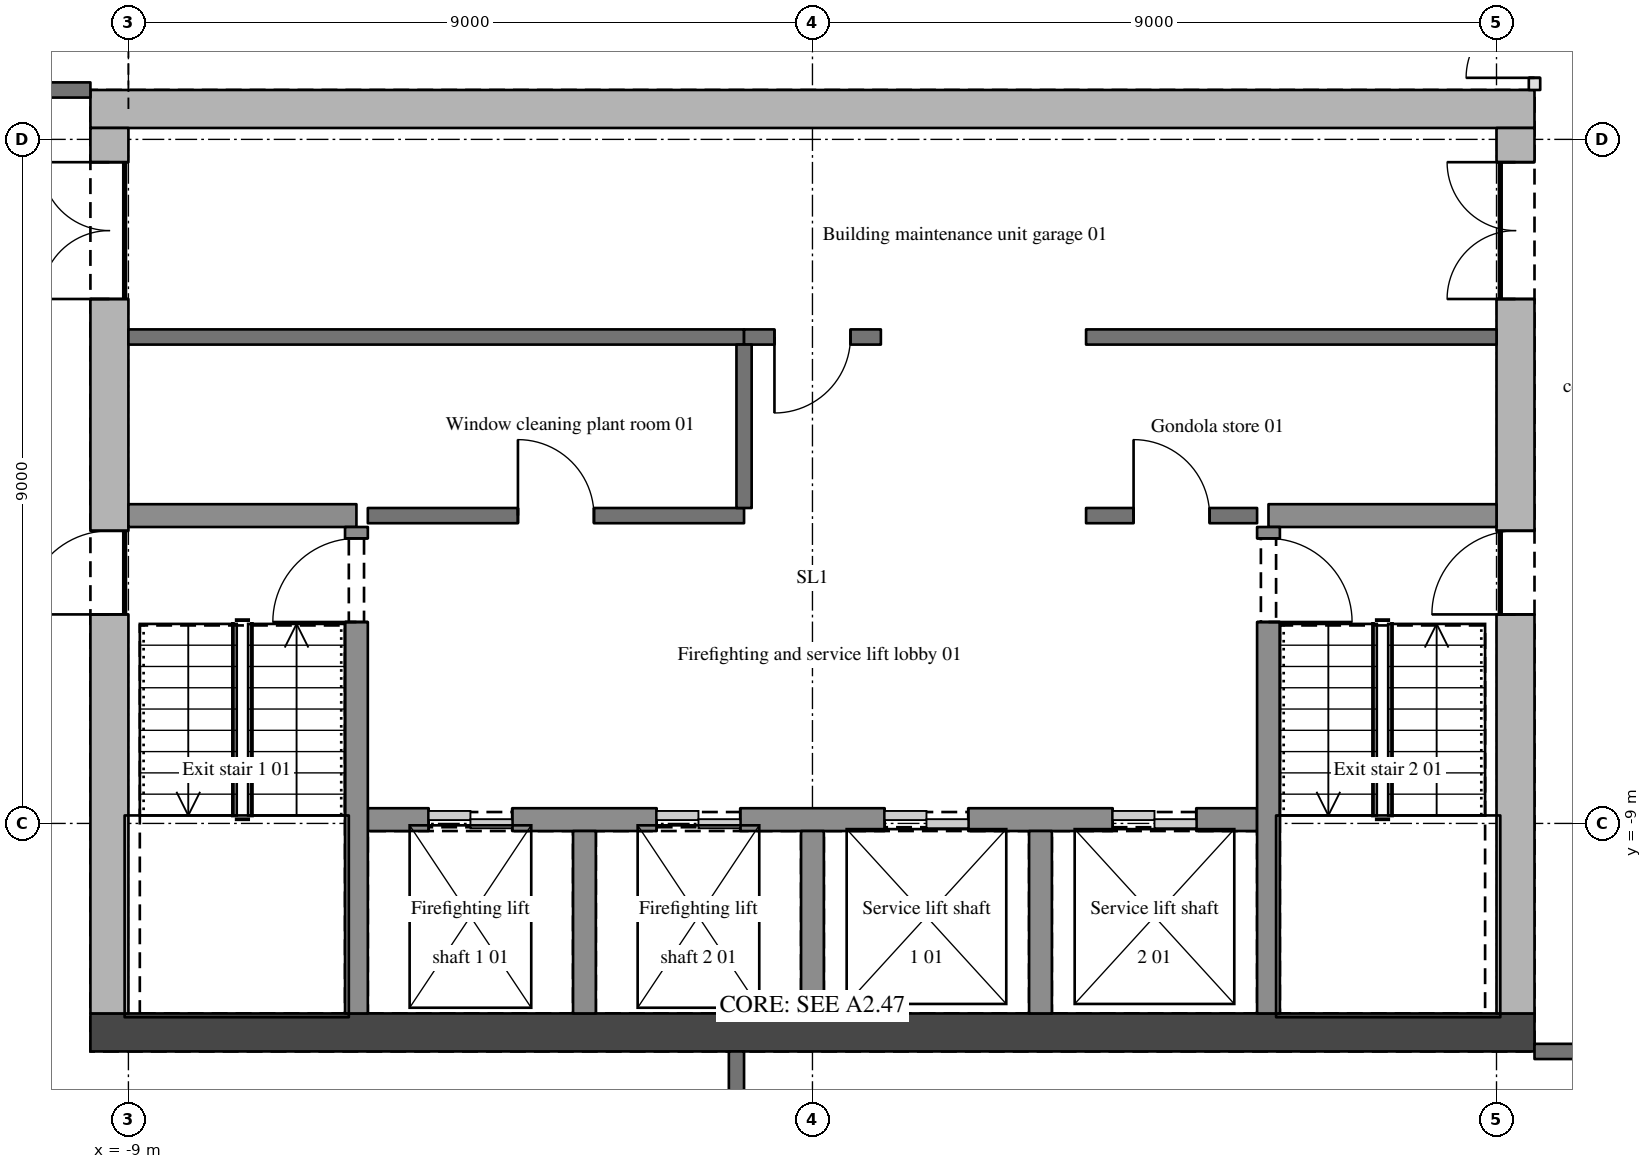
"""IFC4 building model, lengths in metres.
Left out: names, types, materials, properties, quantities, classifications, styles, units other than length and angle.
Written with IfcOpenShell. Run it as: python <this file> out.ifc"""

import sys

from ifc_helpers import new_model, si_unit, direction, frame, frame_2d, origin, place, context, subcontext, project, spatial, polyline, rectangle, outline, extrude, element, fill, save


model = new_model("IFC4")
c1 = context("Model", 3, precision=1e-05, world=origin(), true_north=direction((0.0, 1.0)))
c2 = subcontext(c1, "Body", "Model", "MODEL_VIEW")
j1 = project(units=[si_unit("LENGTHUNIT", "METRE"), si_unit("PLANEANGLEUNIT", "RADIAN")], contexts=[c1])
p1 = place(None, origin())
s1 = spatial("IfcSite", under=j1, at=p1, CompositionType="ELEMENT")
p2 = place(p1, origin())
s2 = spatial("IfcBuilding", under=s1, at=p2, CompositionType="ELEMENT")
p3 = place(p2, frame((0.0, 0.0, 308.1)))
s3 = spatial("IfcBuildingStorey", under=s2, at=p3, CompositionType="ELEMENT", Elevation=308.1)
for number, where, z_axis, x_axis in (
    (1, (-9.5, -11.75, 0.0), (0.0, 0.0, 1.0), (1.0, 0.0, 0.0)),
    (2, (-9.5, 0.4, 0.0), (0.0, 0.0, 1.0), (1.0, 0.0, 0.0)),
):
    element("IfcWall", number, at=place(p3, frame(where, z_axis=z_axis, x_axis=x_axis)), inside=s3, PredefinedType="SHEAR", context=c2, shape_type="SweptSolid", body=[
        extrude(outline(polyline([(0.0, 0.0), (19.0, 0.0), (19.0, 3.6), (0.0, 3.6), (0.0, 0.0)])), frame((0.0, 0.25, 0.0), z_axis=(0.0, -1.0, 0.0), x_axis=(1.0, 0.0, 0.0)), (0.0, 0.0, 1.0), 0.5),
    ])
p4 = place(p3, frame((-9.25, -11.5, 0.0), z_axis=(0.0, 0.0, 1.0), x_axis=(0.0, 1.0, 0.0)))
e3 = element("IfcWall", 3, at=p4, inside=s3, PredefinedType="SHEAR", context=c2, shape_type="SweptSolid", body=[
    extrude(outline(polyline([(0.0, 0.0), (11.65, 0.0), (11.65, 3.6), (0.0, 3.6), (0.0, 0.0)])), frame((0.0, 0.25, 0.0), z_axis=(0.0, -1.0, 0.0), x_axis=(1.0, 0.0, 0.0)), (0.0, 0.0, 1.0), 0.5),
])
p5 = place(p4, frame((9.4, 0.0, 0.0)))
e4 = element("IfcOpeningElement", 4, at=p5, cuts=e3, PredefinedType="OPENING", context=c2, shape_type="SweptSolid", body=[
    extrude(rectangle(XDim=1.8, YDim=2.1, at=frame_2d((0.9, 1.05))), frame((0.0, 0.26, 0.0), z_axis=(0.0, -1.0, 0.0), x_axis=(1.0, 0.0, 0.0)), (0.0, 0.0, 1.0), 0.52),
])
p6 = place(p4, frame((5.25, 0.0, 0.0)))
e5 = element("IfcOpeningElement", 5, at=p6, cuts=e3, PredefinedType="OPENING", context=c2, shape_type="SweptSolid", body=[
    extrude(rectangle(XDim=1.1, YDim=2.1, at=frame_2d((0.55, 1.05))), frame((0.0, 0.26, 0.0), z_axis=(0.0, -1.0, 0.0), x_axis=(1.0, 0.0, 0.0)), (0.0, 0.0, 1.0), 0.52),
])
p7 = place(p3, frame((9.25, -11.5, 0.0), z_axis=(0.0, 0.0, 1.0), x_axis=(0.0, 1.0, 0.0)))
e6 = element("IfcWall", 6, at=p7, inside=s3, PredefinedType="SHEAR", context=c2, shape_type="SweptSolid", body=[
    extrude(outline(polyline([(0.0, 0.0), (11.65, 0.0), (11.65, 3.6), (0.0, 3.6), (0.0, 0.0)])), frame((0.0, 0.25, 0.0), z_axis=(0.0, -1.0, 0.0), x_axis=(1.0, 0.0, 0.0)), (0.0, 0.0, 1.0), 0.5),
])
p8 = place(p7, frame((9.4, 0.0, 0.0)))
e7 = element("IfcOpeningElement", 7, at=p8, cuts=e6, PredefinedType="OPENING", context=c2, shape_type="SweptSolid", body=[
    extrude(rectangle(XDim=1.8, YDim=2.1, at=frame_2d((0.9, 1.05))), frame((0.0, 0.26, 0.0), z_axis=(0.0, -1.0, 0.0), x_axis=(1.0, 0.0, 0.0)), (0.0, 0.0, 1.0), 0.52),
])
p9 = place(p7, frame((5.25, 0.0, 0.0)))
e8 = element("IfcOpeningElement", 8, at=p9, cuts=e6, PredefinedType="OPENING", context=c2, shape_type="SweptSolid", body=[
    extrude(rectangle(XDim=1.1, YDim=2.1, at=frame_2d((0.55, 1.05))), frame((0.0, 0.26, 0.0), z_axis=(0.0, -1.0, 0.0), x_axis=(1.0, 0.0, 0.0)), (0.0, 0.0, 1.0), 0.52),
])
p10 = place(p3, frame((11.45, -12.0, 0.0), z_axis=(0.0, 0.0, 1.0), x_axis=(-1.0, 0.0, 0.0)))
e9 = element("IfcWall", 9, at=p10, inside=s3, PredefinedType="SOLIDWALL", context=c2, shape_type="SweptSolid", body=[
    extrude(rectangle(XDim=1.95, YDim=0.2, at=frame_2d((0.975, 0.0))), origin(), (0.0, 0.0, 1.0), 2.66),
])
p11 = place(p10, frame((0.525, 0.0, 0.0)))
e10 = element("IfcOpeningElement", 10, at=p11, cuts=e9, PredefinedType="OPENING", context=c2, shape_type="SweptSolid", body=[
    extrude(rectangle(XDim=0.9, YDim=2.1, at=frame_2d((0.45, 1.05))), frame((0.0, 0.11, 0.0), z_axis=(0.0, -1.0, 0.0), x_axis=(1.0, 0.0, 0.0)), (0.0, 0.0, 1.0), 0.22),
])
p12 = place(p3, frame((-5.85, -8.95, 0.0), z_axis=(0.0, 0.0, 1.0), x_axis=(1.0, 0.0, 0.0)))
e11 = element("IfcWall", 11, at=p12, inside=s3, PredefinedType="SHEAR", context=c2, shape_type="SweptSolid", body=[
    extrude(rectangle(XDim=11.7, YDim=0.3, at=frame_2d((5.85, 0.0))), origin(), (0.0, 0.0, 1.0), 3.6),
])
p13 = place(p12, frame((0.8, 0.0, 0.0)))
e12 = element("IfcOpeningElement", 12, at=p13, cuts=e11, PredefinedType="OPENING", context=c2, shape_type="SweptSolid", body=[
    extrude(rectangle(XDim=1.1, YDim=2.1, at=frame_2d((0.55, 1.05))), frame((0.0, 0.16, 0.0), z_axis=(0.0, -1.0, 0.0), x_axis=(1.0, 0.0, 0.0)), (0.0, 0.0, 1.0), 0.32),
])
p14 = place(p12, frame((3.8, 0.0, 0.0)))
e13 = element("IfcOpeningElement", 13, at=p14, cuts=e11, PredefinedType="OPENING", context=c2, shape_type="SweptSolid", body=[
    extrude(rectangle(XDim=1.1, YDim=2.1, at=frame_2d((0.55, 1.05))), frame((0.0, 0.16, 0.0), z_axis=(0.0, -1.0, 0.0), x_axis=(1.0, 0.0, 0.0)), (0.0, 0.0, 1.0), 0.32),
])
p15 = place(p12, frame((6.8, 0.0, 0.0)))
e14 = element("IfcOpeningElement", 14, at=p15, cuts=e11, PredefinedType="OPENING", context=c2, shape_type="SweptSolid", body=[
    extrude(rectangle(XDim=1.1, YDim=2.1, at=frame_2d((0.55, 1.05))), frame((0.0, 0.16, 0.0), z_axis=(0.0, -1.0, 0.0), x_axis=(1.0, 0.0, 0.0)), (0.0, 0.0, 1.0), 0.32),
])
p16 = place(p12, frame((9.8, 0.0, 0.0)))
e15 = element("IfcOpeningElement", 15, at=p16, cuts=e11, PredefinedType="OPENING", context=c2, shape_type="SweptSolid", body=[
    extrude(rectangle(XDim=1.1, YDim=2.1, at=frame_2d((0.55, 1.05))), frame((0.0, 0.16, 0.0), z_axis=(0.0, -1.0, 0.0), x_axis=(1.0, 0.0, 0.0)), (0.0, 0.0, 1.0), 0.32),
])
p17 = place(p3, frame((-9.0, -4.95, 0.0), z_axis=(0.0, 0.0, 1.0), x_axis=(1.0, 0.0, 0.0)))
e16 = element("IfcWall", 16, at=p17, inside=s3, PredefinedType="SHEAR", context=c2, shape_type="SweptSolid", body=[
    extrude(rectangle(XDim=3.0, YDim=0.3, at=frame_2d((1.5, 0.0))), origin(), (0.0, 0.0, 1.0), 3.6),
])
p18 = place(p3, frame((-5.85, -4.95, 0.0), z_axis=(0.0, 0.0, 1.0), x_axis=(1.0, 0.0, 0.0)))
e17 = element("IfcWall", 17, at=p18, inside=s3, PredefinedType="SOLIDWALL", context=c2, shape_type="SweptSolid", body=[
    extrude(rectangle(XDim=4.95, YDim=0.2, at=frame_2d((2.475, 0.0))), origin(), (0.0, 0.0, 1.0), 3.3),
])
p19 = place(p18, frame((1.975, 0.0, 0.0)))
e18 = element("IfcOpeningElement", 18, at=p19, cuts=e17, PredefinedType="OPENING", context=c2, shape_type="SweptSolid", body=[
    extrude(rectangle(XDim=1.0, YDim=2.1, at=frame_2d((0.5, 1.05))), frame((0.0, 0.11, 0.0), z_axis=(0.0, -1.0, 0.0), x_axis=(1.0, 0.0, 0.0)), (0.0, 0.0, 1.0), 0.22),
])
p20 = place(p3, frame((3.6, -4.95, 0.0), z_axis=(0.0, 0.0, 1.0), x_axis=(1.0, 0.0, 0.0)))
e19 = element("IfcWall", 19, at=p20, inside=s3, PredefinedType="SOLIDWALL", context=c2, shape_type="SweptSolid", body=[
    extrude(rectangle(XDim=2.25, YDim=0.2, at=frame_2d((1.125, 0.0))), origin(), (0.0, 0.0, 1.0), 3.3),
])
p21 = place(p20, frame((0.625, 0.0, 0.0)))
e20 = element("IfcOpeningElement", 20, at=p21, cuts=e19, PredefinedType="OPENING", context=c2, shape_type="SweptSolid", body=[
    extrude(rectangle(XDim=1.0, YDim=2.1, at=frame_2d((0.5, 1.05))), frame((0.0, 0.11, 0.0), z_axis=(0.0, -1.0, 0.0), x_axis=(1.0, 0.0, 0.0)), (0.0, 0.0, 1.0), 0.22),
])
p22 = place(p3, frame((6.0, -4.95, 0.0), z_axis=(0.0, 0.0, 1.0), x_axis=(1.0, 0.0, 0.0)))
e21 = element("IfcWall", 21, at=p22, inside=s3, PredefinedType="SHEAR", context=c2, shape_type="SweptSolid", body=[
    extrude(rectangle(XDim=3.0, YDim=0.3, at=frame_2d((1.5, 0.0))), origin(), (0.0, 0.0, 1.0), 3.6),
])
p23 = place(p3, frame((-9.0, -2.6, 0.0), z_axis=(0.0, 0.0, 1.0), x_axis=(1.0, 0.0, 0.0)))
e22 = element("IfcWall", 22, at=p23, inside=s3, PredefinedType="SOLIDWALL", context=c2, shape_type="SweptSolid", body=[
    extrude(rectangle(XDim=8.1, YDim=0.2, at=frame_2d((4.05, 0.0))), origin(), (0.0, 0.0, 1.0), 2.66),
])
p24 = place(p3, frame((0.9, -2.6, 0.0), z_axis=(0.0, 0.0, 1.0), x_axis=(-1.0, 0.0, 0.0)))
e23 = element("IfcWall", 23, at=p24, inside=s3, PredefinedType="SOLIDWALL", context=c2, shape_type="SweptSolid", body=[
    extrude(rectangle(XDim=1.8, YDim=0.2, at=frame_2d((0.9, 0.0))), origin(), (0.0, 0.0, 1.0), 3.3),
])
p25 = place(p24, frame((0.4, 0.0, 0.0)))
e24 = element("IfcOpeningElement", 24, at=p25, cuts=e23, PredefinedType="OPENING", context=c2, shape_type="SweptSolid", body=[
    extrude(rectangle(XDim=1.0, YDim=2.1, at=frame_2d((0.5, 1.05))), frame((0.0, 0.11, 0.0), z_axis=(0.0, -1.0, 0.0), x_axis=(1.0, 0.0, 0.0)), (0.0, 0.0, 1.0), 0.22),
])
p26 = place(p3, frame((3.6, -2.6, 0.0), z_axis=(0.0, 0.0, 1.0), x_axis=(1.0, 0.0, 0.0)))
e25 = element("IfcWall", 25, at=p26, inside=s3, PredefinedType="SOLIDWALL", context=c2, shape_type="SweptSolid", body=[
    extrude(rectangle(XDim=5.4, YDim=0.2, at=frame_2d((2.7, 0.0))), origin(), (0.0, 0.0, 1.0), 2.66),
])
p27 = place(p3, frame((-12.1, 0.65, 0.0), z_axis=(0.0, 0.0, 1.0), x_axis=(1.0, 0.0, 0.0)))
e26 = element("IfcWall", 26, at=p27, inside=s3, PredefinedType="SOLIDWALL", context=c2, shape_type="SweptSolid", body=[
    extrude(rectangle(XDim=2.6, YDim=0.2, at=frame_2d((1.3, 0.0))), origin(), (0.0, 0.0, 1.0), 2.66),
])
p28 = place(p27, frame((0.85, 0.0, 0.0)))
e27 = element("IfcOpeningElement", 27, at=p28, cuts=e26, PredefinedType="OPENING", context=c2, shape_type="SweptSolid", body=[
    extrude(rectangle(XDim=0.9, YDim=2.1, at=frame_2d((0.45, 1.05))), frame((0.0, 0.11, 0.0), z_axis=(0.0, -1.0, 0.0), x_axis=(1.0, 0.0, 0.0)), (0.0, 0.0, 1.0), 0.22),
])
p29 = place(p3, frame((-6.0, -11.5, 0.0), z_axis=(0.0, 0.0, 1.0), x_axis=(0.0, 1.0, 0.0)))
e28 = element("IfcWall", 28, at=p29, inside=s3, PredefinedType="SHEAR", context=c2, shape_type="SweptSolid", body=[
    extrude(rectangle(XDim=6.4, YDim=0.3, at=frame_2d((3.2, 0.0))), origin(), (0.0, 0.0, 1.0), 3.6),
])
p30 = place(p29, frame((5.15, 0.0, 0.0)))
e29 = element("IfcOpeningElement", 29, at=p30, cuts=e28, PredefinedType="OPENING", context=c2, shape_type="SweptSolid", body=[
    extrude(rectangle(XDim=1.1, YDim=2.1, at=frame_2d((0.55, 1.05))), frame((0.0, 0.16, 0.0), z_axis=(0.0, -1.0, 0.0), x_axis=(1.0, 0.0, 0.0)), (0.0, 0.0, 1.0), 0.32),
])
p31 = place(p3, frame((-3.0, -11.5, 0.0), z_axis=(0.0, 0.0, 1.0), x_axis=(0.0, 1.0, 0.0)))
e30 = element("IfcWall", 30, at=p31, inside=s3, PredefinedType="SHEAR", context=c2, shape_type="SweptSolid", body=[
    extrude(rectangle(XDim=2.4, YDim=0.3, at=frame_2d((1.2, 0.0))), origin(), (0.0, 0.0, 1.0), 3.6),
])
p32 = place(p3, frame((-1.0, -13.7, 0.0), z_axis=(0.0, 0.0, 1.0), x_axis=(0.0, 1.0, 0.0)))
e31 = element("IfcWall", 31, at=p32, inside=s3, PredefinedType="SOLIDWALL", context=c2, shape_type="SweptSolid", body=[
    extrude(rectangle(XDim=1.7, YDim=0.2, at=frame_2d((0.85, 0.0))), origin(), (0.0, 0.0, 1.0), 2.66),
])
p33 = place(p3, frame((-0.9, -4.85, 0.0), z_axis=(0.0, 0.0, 1.0), x_axis=(0.0, 1.0, 0.0)))
e32 = element("IfcWall", 32, at=p33, inside=s3, PredefinedType="SOLIDWALL", context=c2, shape_type="SweptSolid", body=[
    extrude(rectangle(XDim=2.15, YDim=0.2, at=frame_2d((1.075, 0.0))), origin(), (0.0, 0.0, 1.0), 3.3),
])
for number, where, z_axis, x_axis in (
    (33, (0.0, -11.5, 0.0), (0.0, 0.0, 1.0), (0.0, 1.0, 0.0)),
    (34, (3.0, -11.5, 0.0), (0.0, 0.0, 1.0), (0.0, 1.0, 0.0)),
):
    element("IfcWall", number, at=place(p3, frame(where, z_axis=z_axis, x_axis=x_axis)), inside=s3, PredefinedType="SHEAR", context=c2, shape_type="SweptSolid", body=[
        extrude(rectangle(XDim=2.4, YDim=0.3, at=frame_2d((1.2, 0.0))), origin(), (0.0, 0.0, 1.0), 3.6),
    ])
p34 = place(p3, frame((6.0, -5.1, 0.0), z_axis=(0.0, 0.0, 1.0), x_axis=(0.0, -1.0, 0.0)))
e35 = element("IfcWall", 35, at=p34, inside=s3, PredefinedType="SHEAR", context=c2, shape_type="SweptSolid", body=[
    extrude(rectangle(XDim=6.4, YDim=0.3, at=frame_2d((3.2, 0.0))), origin(), (0.0, 0.0, 1.0), 3.6),
])
p35 = place(p34, frame((0.15, 0.0, 0.0)))
e36 = element("IfcOpeningElement", 36, at=p35, cuts=e35, PredefinedType="OPENING", context=c2, shape_type="SweptSolid", body=[
    extrude(rectangle(XDim=1.1, YDim=2.1, at=frame_2d((0.55, 1.05))), frame((0.0, 0.16, 0.0), z_axis=(0.0, -1.0, 0.0), x_axis=(1.0, 0.0, 0.0)), (0.0, 0.0, 1.0), 0.32),
])
p36 = place(p3, frame((9.5, 0.65, 0.0), z_axis=(0.0, 0.0, 1.0), x_axis=(0.0, 1.0, 0.0)))
e37 = element("IfcWall", 37, at=p36, inside=s3, PredefinedType="PARTITIONING", context=c2, shape_type="SweptSolid", body=[
    extrude(rectangle(XDim=1.22, YDim=0.15, at=frame_2d((0.61, 0.0))), origin(), (0.0, 0.0, 1.0), 2.66),
])
p37 = place(p36, frame((0.16, 0.0, 0.0)))
e38 = element("IfcOpeningElement", 38, at=p37, cuts=e37, PredefinedType="OPENING", context=c2, shape_type="SweptSolid", body=[
    extrude(rectangle(XDim=0.9, YDim=2.1, at=frame_2d((0.45, 1.05))), frame((0.0, 0.085, 0.0), z_axis=(0.0, -1.0, 0.0), x_axis=(1.0, 0.0, 0.0)), (0.0, 0.0, 1.0), 0.17),
])
p38 = place(p8, origin())
e39 = element("IfcDoor", 39, at=p38, inside=s3, OperationType="DOUBLE_DOOR_SINGLE_SWING", PredefinedType="DOOR", context=c2, shape_type="SweptSolid", body=[
    extrude(rectangle(XDim=1.8, YDim=2.1, at=frame_2d((0.9, 1.05))), frame((0.0, 0.025, 0.0), z_axis=(0.0, -1.0, 0.0), x_axis=(1.0, 0.0, 0.0)), (0.0, 0.0, 1.0), 0.05),
])
fill(e7, e39)
p39 = place(p25, origin())
e40 = element("IfcDoor", 40, at=p39, inside=s3, OperationType="SINGLE_SWING_RIGHT", PredefinedType="DOOR", context=c2, shape_type="SweptSolid", body=[
    extrude(rectangle(XDim=1.0, YDim=2.1, at=frame_2d((0.5, 1.05))), frame((0.0, 0.025, 0.0), z_axis=(0.0, -1.0, 0.0), x_axis=(1.0, 0.0, 0.0)), (0.0, 0.0, 1.0), 0.05),
])
fill(e24, e40)
p40 = place(p5, origin())
e41 = element("IfcDoor", 41, at=p40, inside=s3, OperationType="DOUBLE_DOOR_SINGLE_SWING", PredefinedType="DOOR", context=c2, shape_type="SweptSolid", body=[
    extrude(rectangle(XDim=1.8, YDim=2.1, at=frame_2d((0.9, 1.05))), frame((0.0, 0.025, 0.0), z_axis=(0.0, -1.0, 0.0), x_axis=(1.0, 0.0, 0.0)), (0.0, 0.0, 1.0), 0.05),
])
fill(e4, e41)
p41 = place(p30, origin())
e42 = element("IfcDoor", 42, at=p41, inside=s3, OperationType="SINGLE_SWING_LEFT", PredefinedType="DOOR", context=c2, shape_type="SweptSolid", body=[
    extrude(rectangle(XDim=1.1, YDim=2.1, at=frame_2d((0.55, 1.05))), frame((0.0, 0.025, 0.0), z_axis=(0.0, -1.0, 0.0), x_axis=(1.0, 0.0, 0.0)), (0.0, 0.0, 1.0), 0.05),
])
fill(e29, e42)
p42 = place(p6, origin())
e43 = element("IfcDoor", 43, at=p42, inside=s3, OperationType="SINGLE_SWING_LEFT", PredefinedType="DOOR", context=c2, shape_type="SweptSolid", body=[
    extrude(rectangle(XDim=1.1, YDim=2.1, at=frame_2d((0.55, 1.05))), frame((0.0, 0.025, 0.0), z_axis=(0.0, -1.0, 0.0), x_axis=(1.0, 0.0, 0.0)), (0.0, 0.0, 1.0), 0.05),
])
fill(e5, e43)
p43 = place(p35, origin())
e44 = element("IfcDoor", 44, at=p43, inside=s3, OperationType="SINGLE_SWING_RIGHT", PredefinedType="DOOR", context=c2, shape_type="SweptSolid", body=[
    extrude(rectangle(XDim=1.1, YDim=2.1, at=frame_2d((0.55, 1.05))), frame((0.0, 0.025, 0.0), z_axis=(0.0, -1.0, 0.0), x_axis=(1.0, 0.0, 0.0)), (0.0, 0.0, 1.0), 0.05),
])
fill(e36, e44)
p44 = place(p9, origin())
e45 = element("IfcDoor", 45, at=p44, inside=s3, OperationType="SINGLE_SWING_LEFT", PredefinedType="DOOR", context=c2, shape_type="SweptSolid", body=[
    extrude(rectangle(XDim=1.1, YDim=2.1, at=frame_2d((0.55, 1.05))), frame((0.0, 0.025, 0.0), z_axis=(0.0, -1.0, 0.0), x_axis=(1.0, 0.0, 0.0)), (0.0, 0.0, 1.0), 0.05),
])
fill(e8, e45)
p45 = place(p37, origin())
e46 = element("IfcDoor", 46, at=p45, inside=s3, OperationType="SINGLE_SWING_LEFT", PredefinedType="DOOR", context=c2, shape_type="SweptSolid", body=[
    extrude(rectangle(XDim=0.9, YDim=2.1, at=frame_2d((0.45, 1.05))), frame((0.0, 0.025, 0.0), z_axis=(0.0, -1.0, 0.0), x_axis=(1.0, 0.0, 0.0)), (0.0, 0.0, 1.0), 0.05),
])
fill(e38, e46)
p46 = place(p19, origin())
e47 = element("IfcDoor", 47, at=p46, inside=s3, OperationType="SINGLE_SWING_LEFT", PredefinedType="DOOR", context=c2, shape_type="SweptSolid", body=[
    extrude(rectangle(XDim=1.0, YDim=2.1, at=frame_2d((0.5, 1.05))), frame((0.0, 0.025, 0.0), z_axis=(0.0, -1.0, 0.0), x_axis=(1.0, 0.0, 0.0)), (0.0, 0.0, 1.0), 0.05),
])
fill(e18, e47)
p47 = place(p21, origin())
e48 = element("IfcDoor", 48, at=p47, inside=s3, OperationType="SINGLE_SWING_LEFT", PredefinedType="DOOR", context=c2, shape_type="SweptSolid", body=[
    extrude(rectangle(XDim=1.0, YDim=2.1, at=frame_2d((0.5, 1.05))), frame((0.0, 0.025, 0.0), z_axis=(0.0, -1.0, 0.0), x_axis=(1.0, 0.0, 0.0)), (0.0, 0.0, 1.0), 0.05),
])
fill(e20, e48)
p48 = place(p13, origin())
e49 = element("IfcDoor", 49, at=p48, inside=s3, OperationType="DOUBLE_DOOR_SLIDING", PredefinedType="DOOR", context=c2, shape_type="SweptSolid", body=[
    extrude(rectangle(XDim=1.1, YDim=2.1, at=frame_2d((0.55, 1.05))), frame((0.0, 0.025, 0.0), z_axis=(0.0, -1.0, 0.0), x_axis=(1.0, 0.0, 0.0)), (0.0, 0.0, 1.0), 0.05),
])
fill(e12, e49)
p49 = place(p14, origin())
e50 = element("IfcDoor", 50, at=p49, inside=s3, OperationType="DOUBLE_DOOR_SLIDING", PredefinedType="DOOR", context=c2, shape_type="SweptSolid", body=[
    extrude(rectangle(XDim=1.1, YDim=2.1, at=frame_2d((0.55, 1.05))), frame((0.0, 0.025, 0.0), z_axis=(0.0, -1.0, 0.0), x_axis=(1.0, 0.0, 0.0)), (0.0, 0.0, 1.0), 0.05),
])
fill(e13, e50)
p50 = place(p15, origin())
e51 = element("IfcDoor", 51, at=p50, inside=s3, OperationType="DOUBLE_DOOR_SLIDING", PredefinedType="DOOR", context=c2, shape_type="SweptSolid", body=[
    extrude(rectangle(XDim=1.1, YDim=2.1, at=frame_2d((0.55, 1.05))), frame((0.0, 0.025, 0.0), z_axis=(0.0, -1.0, 0.0), x_axis=(1.0, 0.0, 0.0)), (0.0, 0.0, 1.0), 0.05),
])
fill(e14, e51)
p51 = place(p16, origin())
e52 = element("IfcDoor", 52, at=p51, inside=s3, OperationType="DOUBLE_DOOR_SLIDING", PredefinedType="DOOR", context=c2, shape_type="SweptSolid", body=[
    extrude(rectangle(XDim=1.1, YDim=2.1, at=frame_2d((0.55, 1.05))), frame((0.0, 0.025, 0.0), z_axis=(0.0, -1.0, 0.0), x_axis=(1.0, 0.0, 0.0)), (0.0, 0.0, 1.0), 0.05),
])
fill(e15, e52)
save(model, sys.argv[1])
